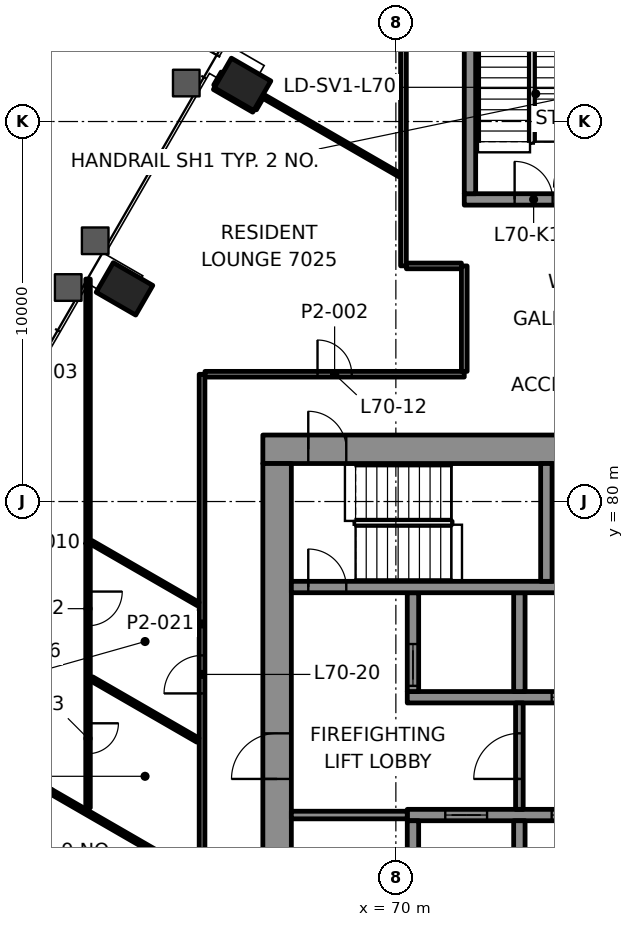
"""IFC4 building model, lengths in metres.
Left out: names, types, materials, properties, quantities, classifications, styles, units other than length and angle.
Written with IfcOpenShell. Run it as: python <this file> out.ifc"""

import sys

from ifc_helpers import new_model, si_unit, direction, frame, frame_2d, origin, origin_2d, place, context, subcontext, project, spatial, rectangle, hollow_rectangle, extrude, element, fill, save


model = new_model("IFC4")
c1 = context("Model", 3, precision=1e-05, world=origin(), true_north=direction((0.0, 1.0)))
c2 = subcontext(c1, "Body", "Model", "MODEL_VIEW")
j1 = project(units=[si_unit("LENGTHUNIT", "METRE"), si_unit("PLANEANGLEUNIT", "RADIAN")], contexts=[c1])
p1 = place(None, origin())
s1 = spatial("IfcSite", under=j1, at=p1, CompositionType="ELEMENT")
p2 = place(p1, origin())
s2 = spatial("IfcBuilding", under=s1, at=p2, CompositionType="ELEMENT")
p3 = place(p2, frame((0.0, 0.0, 291.6)))
s3 = spatial("IfcBuildingStorey", under=s2, at=p3, CompositionType="ELEMENT", Elevation=291.6)
for number, where, z_axis, x_axis in (
    (1, (65.966, 90.978, -0.0), (0.0, 0.0, 1.0), (-0.5, -0.866, 0.0)),
    (2, (62.859, 85.597, -0.0), (0.0, 0.0, 1.0), (-0.5, -0.866, 0.0)),
):
    element("IfcColumn", number, at=place(p3, frame(where, z_axis=z_axis, x_axis=x_axis)), inside=s3, PredefinedType="COLUMN", context=c2, shape_type="SweptSolid", body=[
        extrude(hollow_rectangle(XDim=0.9, YDim=1.2, WallThickness=0.06, at=origin_2d()), origin(), (0.0, 0.0, 1.0), 3.5),
    ])
p4 = place(p3, frame((66.5, 81.375, 0.0), z_axis=(0.0, 0.0, 1.0), x_axis=(1.0, 0.0, 0.0)))
e3 = element("IfcWall", 3, at=p4, inside=s3, PredefinedType="SHEAR", context=c2, shape_type="SweptSolid", body=[
    extrude(rectangle(XDim=17.0, YDim=0.75, at=frame_2d((8.5, 0.0))), origin(), (0.0, 0.0, 1.0), 3.3),
])
p5 = place(p4, frame((1.195, 0.0, 0.0)))
e4 = element("IfcOpeningElement", 4, at=p5, cuts=e3, PredefinedType="OPENING", context=c2, shape_type="SweptSolid", body=[
    extrude(rectangle(XDim=1.0, YDim=2.1, at=frame_2d((0.5, 1.05))), frame((0.0, 0.385, 0.0), z_axis=(0.0, -1.0, 0.0), x_axis=(1.0, 0.0, 0.0)), (0.0, 0.0, 1.0), 0.77),
])
p6 = place(p4, frame((15.005, 0.0, 0.0)))
e5 = element("IfcOpeningElement", 5, at=p6, cuts=e3, PredefinedType="OPENING", context=c2, shape_type="SweptSolid", body=[
    extrude(rectangle(XDim=1.0, YDim=2.1, at=frame_2d((0.5, 1.05))), frame((0.0, 0.385, 0.0), z_axis=(0.0, -1.0, 0.0), x_axis=(1.0, 0.0, 0.0)), (0.0, 0.0, 1.0), 0.77),
])
p7 = place(p4, frame((8.15, 0.0, 0.0)))
e6 = element("IfcOpeningElement", 6, at=p7, cuts=e3, PredefinedType="OPENING", context=c2, shape_type="SweptSolid", body=[
    extrude(rectangle(XDim=0.9, YDim=2.1, at=frame_2d((0.45, 1.05))), frame((0.0, 0.385, 0.0), z_axis=(0.0, -1.0, 0.0), x_axis=(1.0, 0.0, 0.0)), (0.0, 0.0, 1.0), 0.77),
])
p8 = place(p3, frame((66.875, 69.0, 0.0), z_axis=(0.0, 0.0, 1.0), x_axis=(0.0, 1.0, 0.0)))
e7 = element("IfcWall", 7, at=p8, inside=s3, PredefinedType="SHEAR", context=c2, shape_type="SweptSolid", body=[
    extrude(rectangle(XDim=12.0, YDim=0.75, at=frame_2d((6.0, 0.0))), origin(), (0.0, 0.0, 1.0), 3.3),
])
p9 = place(p8, frame((3.7, 0.0, 0.0)))
e8 = element("IfcOpeningElement", 8, at=p9, cuts=e7, PredefinedType="OPENING", context=c2, shape_type="SweptSolid", body=[
    extrude(rectangle(XDim=1.2, YDim=2.1, at=frame_2d((0.6, 1.05))), frame((0.0, 0.385, 0.0), z_axis=(0.0, -1.0, 0.0), x_axis=(1.0, 0.0, 0.0)), (0.0, 0.0, 1.0), 0.77),
])
p10 = place(p3, frame((70.3, 71.75, 0.0), z_axis=(0.0, 0.0, 1.0), x_axis=(1.0, 0.0, 0.0)))
e9 = element("IfcWall", 9, at=p10, inside=s3, PredefinedType="SHEAR", context=c2, shape_type="SweptSolid", body=[
    extrude(rectangle(XDim=11.5, YDim=0.3, at=frame_2d((5.75, 0.0))), origin(), (0.0, 0.0, 1.0), 3.3),
])
p11 = place(p10, frame((1.0, 0.0, 0.0)))
e10 = element("IfcOpeningElement", 10, at=p11, cuts=e9, PredefinedType="OPENING", context=c2, shape_type="SweptSolid", body=[
    extrude(rectangle(XDim=1.1, YDim=2.1, at=frame_2d((0.55, 1.05))), frame((0.0, 0.16, 0.0), z_axis=(0.0, -1.0, 0.0), x_axis=(1.0, 0.0, 0.0)), (0.0, 0.0, 1.0), 0.32),
])
p12 = place(p10, frame((3.8, 0.0, 0.0)))
e11 = element("IfcOpeningElement", 11, at=p12, cuts=e9, PredefinedType="OPENING", context=c2, shape_type="SweptSolid", body=[
    extrude(rectangle(XDim=1.1, YDim=2.1, at=frame_2d((0.55, 1.05))), frame((0.0, 0.16, 0.0), z_axis=(0.0, -1.0, 0.0), x_axis=(1.0, 0.0, 0.0)), (0.0, 0.0, 1.0), 0.32),
])
p13 = place(p10, frame((6.6, 0.0, 0.0)))
e12 = element("IfcOpeningElement", 12, at=p13, cuts=e9, PredefinedType="OPENING", context=c2, shape_type="SweptSolid", body=[
    extrude(rectangle(XDim=1.1, YDim=2.1, at=frame_2d((0.55, 1.05))), frame((0.0, 0.16, 0.0), z_axis=(0.0, -1.0, 0.0), x_axis=(1.0, 0.0, 0.0)), (0.0, 0.0, 1.0), 0.32),
])
p14 = place(p10, frame((9.4, 0.0, 0.0)))
e13 = element("IfcOpeningElement", 13, at=p14, cuts=e9, PredefinedType="OPENING", context=c2, shape_type="SweptSolid", body=[
    extrude(rectangle(XDim=1.1, YDim=2.1, at=frame_2d((0.55, 1.05))), frame((0.0, 0.16, 0.0), z_axis=(0.0, -1.0, 0.0), x_axis=(1.0, 0.0, 0.0)), (0.0, 0.0, 1.0), 0.32),
])
p15 = place(p3, frame((70.3, 74.85, 0.0), z_axis=(0.0, 0.0, 1.0), x_axis=(1.0, 0.0, 0.0)))
e14 = element("IfcWall", 14, at=p15, inside=s3, PredefinedType="SHEAR", context=c2, shape_type="SweptSolid", body=[
    extrude(rectangle(XDim=5.9, YDim=0.3, at=frame_2d((2.95, 0.0))), origin(), (0.0, 0.0, 1.0), 3.3),
])
p16 = place(p15, frame((3.8, 0.0, 0.0)))
e15 = element("IfcOpeningElement", 15, at=p16, cuts=e14, PredefinedType="OPENING", context=c2, shape_type="SweptSolid", body=[
    extrude(rectangle(XDim=1.1, YDim=2.1, at=frame_2d((0.55, 1.05))), frame((0.0, 0.16, 0.0), z_axis=(0.0, -1.0, 0.0), x_axis=(1.0, 0.0, 0.0)), (0.0, 0.0, 1.0), 0.32),
])
p17 = place(p3, frame((70.45, 69.0, 0.0), z_axis=(0.0, 0.0, 1.0), x_axis=(0.0, 1.0, 0.0)))
e16 = element("IfcWall", 16, at=p17, inside=s3, PredefinedType="SHEAR", context=c2, shape_type="SweptSolid", body=[
    extrude(rectangle(XDim=2.6, YDim=0.3, at=frame_2d((1.3, 0.0))), origin(), (0.0, 0.0, 1.0), 3.3),
])
p18 = place(p3, frame((70.45, 75.0, 0.0), z_axis=(0.0, 0.0, 1.0), x_axis=(0.0, 1.0, 0.0)))
e17 = element("IfcWall", 17, at=p18, inside=s3, PredefinedType="SHEAR", context=c2, shape_type="SweptSolid", body=[
    extrude(rectangle(XDim=2.6, YDim=0.3, at=frame_2d((1.3, 0.0))), origin(), (0.0, 0.0, 1.0), 3.3),
])
p19 = place(p18, frame((0.15, 0.0, 0.0)))
e18 = element("IfcOpeningElement", 18, at=p19, cuts=e17, PredefinedType="OPENING", context=c2, shape_type="SweptSolid", body=[
    extrude(rectangle(XDim=1.1, YDim=2.1, at=frame_2d((0.55, 1.05))), frame((0.0, 0.16, 0.0), z_axis=(0.0, -1.0, 0.0), x_axis=(1.0, 0.0, 0.0)), (0.0, 0.0, 1.0), 0.32),
])
for number, where, z_axis, x_axis in (
    (19, (73.25, 69.0, 0.0), (0.0, 0.0, 1.0), (0.0, 1.0, 0.0)),
    (20, (73.25, 75.0, 0.0), (0.0, 0.0, 1.0), (0.0, 1.0, 0.0)),
):
    element("IfcWall", number, at=place(p3, frame(where, z_axis=z_axis, x_axis=x_axis)), inside=s3, PredefinedType="SHEAR", context=c2, shape_type="SweptSolid", body=[
        extrude(rectangle(XDim=2.6, YDim=0.3, at=frame_2d((1.3, 0.0))), origin(), (0.0, 0.0, 1.0), 3.3),
    ])
p20 = place(p3, frame((67.25, 77.75, 0.0), z_axis=(0.0, 0.0, 1.0), x_axis=(1.0, 0.0, 0.0)))
e21 = element("IfcWall", 21, at=p20, inside=s3, PredefinedType="SHEAR", context=c2, shape_type="SweptSolid", body=[
    extrude(rectangle(XDim=15.5, YDim=0.3, at=frame_2d((7.75, 0.0))), origin(), (0.0, 0.0, 1.0), 3.3),
])
p21 = place(p20, frame((0.445, 0.0, 0.0)))
e22 = element("IfcOpeningElement", 22, at=p21, cuts=e21, PredefinedType="OPENING", context=c2, shape_type="SweptSolid", body=[
    extrude(rectangle(XDim=1.0, YDim=2.1, at=frame_2d((0.5, 1.05))), frame((0.0, 0.16, 0.0), z_axis=(0.0, -1.0, 0.0), x_axis=(1.0, 0.0, 0.0)), (0.0, 0.0, 1.0), 0.32),
])
p22 = place(p3, frame((73.96, 77.9, 0.0), z_axis=(0.0, 0.0, 1.0), x_axis=(0.0, 1.0, 0.0)))
e23 = element("IfcWall", 23, at=p22, inside=s3, PredefinedType="SHEAR", context=c2, shape_type="SweptSolid", body=[
    extrude(rectangle(XDim=3.1, YDim=0.3, at=frame_2d((1.55, 0.0))), origin(), (0.0, 0.0, 1.0), 3.3),
])
p23 = place(p3, frame((71.8, 87.95, 0.0), z_axis=(0.0, 0.0, 1.0), x_axis=(1.0, 0.0, 0.0)))
e24 = element("IfcWall", 24, at=p23, inside=s3, PredefinedType="SHEAR", context=c2, shape_type="SweptSolid", body=[
    extrude(rectangle(XDim=6.4, YDim=0.3, at=frame_2d((3.2, 0.0))), origin(), (0.0, 0.0, 1.0), 3.3),
])
p24 = place(p23, frame((1.325, 0.0, 0.0)))
e25 = element("IfcOpeningElement", 25, at=p24, cuts=e24, PredefinedType="OPENING", context=c2, shape_type="SweptSolid", body=[
    extrude(rectangle(XDim=1.0, YDim=2.1, at=frame_2d((0.5, 1.05))), frame((0.0, 0.16, 0.0), z_axis=(0.0, -1.0, 0.0), x_axis=(1.0, 0.0, 0.0)), (0.0, 0.0, 1.0), 0.32),
])
p25 = place(p23, frame((4.125, 0.0, 0.0)))
e26 = element("IfcOpeningElement", 26, at=p25, cuts=e24, PredefinedType="OPENING", context=c2, shape_type="SweptSolid", body=[
    extrude(rectangle(XDim=1.2, YDim=2.1, at=frame_2d((0.6, 1.05))), frame((0.0, 0.16, 0.0), z_axis=(0.0, -1.0, 0.0), x_axis=(1.0, 0.0, 0.0)), (0.0, 0.0, 1.0), 0.32),
])
p26 = place(p3, frame((71.95, 88.1, 0.0), z_axis=(0.0, 0.0, 1.0), x_axis=(0.0, 1.0, 0.0)))
e27 = element("IfcWall", 27, at=p26, inside=s3, PredefinedType="SHEAR", context=c2, shape_type="SweptSolid", body=[
    extrude(rectangle(XDim=6.2, YDim=0.3, at=frame_2d((3.1, 0.0))), origin(), (0.0, 0.0, 1.0), 3.3),
])
p27 = place(p3, frame((64.977, 83.35, 0.0), z_axis=(0.0, 0.0, 1.0), x_axis=(1.0, 0.0, 0.0)))
e28 = element("IfcWall", 28, at=p27, inside=s3, PredefinedType="PARTITIONING", context=c2, shape_type="SweptSolid", body=[
    extrude(rectangle(XDim=6.823, YDim=0.15, at=frame_2d((3.412, 0.0))), origin(), (0.0, 0.0, 1.0), 2.7),
])
p28 = place(p27, frame((2.961, 0.0, 0.0)))
e29 = element("IfcOpeningElement", 29, at=p28, cuts=e28, PredefinedType="OPENING", context=c2, shape_type="SweptSolid", body=[
    extrude(rectangle(XDim=0.9, YDim=2.1, at=frame_2d((0.45, 1.05))), frame((0.0, 0.085, 0.0), z_axis=(0.0, -1.0, 0.0), x_axis=(1.0, 0.0, 0.0)), (0.0, 0.0, 1.0), 0.17),
])
p29 = place(p3, frame((70.277, 86.2, 0.0), z_axis=(0.0, 0.0, 1.0), x_axis=(1.0, 0.0, 0.0)))
e30 = element("IfcWall", 30, at=p29, inside=s3, PredefinedType="PARTITIONING", context=c2, shape_type="SweptSolid", body=[
    extrude(rectangle(XDim=1.448, YDim=0.15, at=frame_2d((0.724, 0.0))), origin(), (0.0, 0.0, 1.0), 2.7),
])
p30 = place(p3, frame((66.288, 90.333, 0.0), z_axis=(0.0, 0.0, 1.0), x_axis=(0.499620918551, 0.866244155967, 0.0)))
e31 = element("IfcWall", 31, at=p30, inside=s3, PredefinedType="PARTITIONING", context=c2, shape_type="SweptSolid", body=[
    extrude(rectangle(XDim=0.347, YDim=0.1, at=frame_2d((0.173, 0.0))), origin(), (0.0, 0.0, 1.0), 2.7),
])
p31 = place(p3, frame((65.251, 90.938, 0.0), z_axis=(0.0, 0.0, 1.0), x_axis=(0.500225704022, 0.865895054285, 0.0)))
e32 = element("IfcWall", 32, at=p31, inside=s3, PredefinedType="PARTITIONING", context=c2, shape_type="SweptSolid", body=[
    extrude(rectangle(XDim=0.392, YDim=0.1, at=frame_2d((0.196, 0.0))), origin(), (0.0, 0.0, 1.0), 2.7),
])
p32 = place(p3, frame((71.8, 83.425, 0.0), z_axis=(0.0, 0.0, 1.0), x_axis=(0.0, 1.0, 0.0)))
e33 = element("IfcWall", 33, at=p32, inside=s3, PredefinedType="PARTITIONING", context=c2, shape_type="SweptSolid", body=[
    extrude(rectangle(XDim=2.775, YDim=0.15, at=frame_2d((1.387, 0.0))), origin(), (0.0, 0.0, 1.0), 2.697),
])
p33 = place(p3, frame((70.2, 86.202, 0.0), z_axis=(0.0, 0.0, 1.0), x_axis=(0.0, 1.0, 0.0)))
e34 = element("IfcWall", 34, at=p33, inside=s3, PredefinedType="PARTITIONING", context=c2, shape_type="SweptSolid", body=[
    extrude(rectangle(XDim=9.998, YDim=0.15, at=frame_2d((4.999, 0.0))), origin(), (0.0, 0.0, 1.0), 2.7),
])
p34 = place(p3, frame((64.9, 70.208, 0.0), z_axis=(0.0, 0.0, 1.0), x_axis=(0.0, 1.0, 0.0)))
e35 = element("IfcWall", 35, at=p34, inside=s3, PredefinedType="PARTITIONING", context=c2, shape_type="SweptSolid", body=[
    extrude(rectangle(XDim=13.14, YDim=0.15, at=frame_2d((6.57, 0.0))), origin(), (0.0, 0.0, 1.0), 2.7),
])
p35 = place(p34, frame((4.743, 0.0, 0.0)))
e36 = element("IfcOpeningElement", 36, at=p35, cuts=e35, PredefinedType="OPENING", context=c2, shape_type="SweptSolid", body=[
    extrude(rectangle(XDim=1.0, YDim=2.1, at=frame_2d((0.5, 1.05))), frame((0.0, 0.085, 0.0), z_axis=(0.0, -1.0, 0.0), x_axis=(1.0, 0.0, 0.0)), (0.0, 0.0, 1.0), 0.17),
])
p36 = place(p3, frame((61.9, 85.855, 0.0), z_axis=(0.0, 0.0, 1.0), x_axis=(0.0, -1.0, 0.0)))
e37 = element("IfcWall", 37, at=p36, inside=s3, PredefinedType="PARTITIONING", context=c2, shape_type="SweptSolid", body=[
    extrude(rectangle(XDim=13.915, YDim=0.12, at=frame_2d((6.958, 0.0))), origin(), (0.0, 0.0, 1.0), 2.688),
])
p37 = place(p36, frame((8.224, 0.0, 0.0)))
e38 = element("IfcOpeningElement", 38, at=p37, cuts=e37, PredefinedType="OPENING", context=c2, shape_type="SweptSolid", body=[
    extrude(rectangle(XDim=0.9, YDim=2.1, at=frame_2d((0.45, 1.05))), frame((0.0, 0.07, 0.0), z_axis=(0.0, -1.0, 0.0), x_axis=(1.0, 0.0, 0.0)), (0.0, 0.0, 1.0), 0.14),
])
p38 = place(p36, frame((11.69, 0.0, 0.0)))
e39 = element("IfcOpeningElement", 39, at=p38, cuts=e37, PredefinedType="OPENING", context=c2, shape_type="SweptSolid", body=[
    extrude(rectangle(XDim=0.8, YDim=2.1, at=frame_2d((0.4, 1.05))), frame((0.0, 0.07, 0.0), z_axis=(0.0, -1.0, 0.0), x_axis=(1.0, 0.0, 0.0)), (0.0, 0.0, 1.0), 0.14),
])
p39 = place(p3, frame((70.099, 88.592, 0.0), z_axis=(0.0, 0.0, 1.0), x_axis=(-0.866045268016, 0.499965592563, 0.0)))
e40 = element("IfcWall", 40, at=p39, inside=s3, PredefinedType="PARTITIONING", context=c2, shape_type="SweptSolid", body=[
    extrude(rectangle(XDim=4.172, YDim=0.1, at=frame_2d((2.086, 0.0))), origin(), (0.0, 0.0, 1.0), 2.7),
])
p40 = place(p3, frame((66.258, 90.29, 0.0), z_axis=(0.0, 0.0, 1.0), x_axis=(-0.866032345022, 0.499987977232, 0.0)))
e41 = element("IfcWall", 41, at=p40, inside=s3, PredefinedType="PARTITIONING", context=c2, shape_type="SweptSolid", body=[
    extrude(rectangle(XDim=1.194, YDim=0.1, at=frame_2d((0.597, 0.0))), origin(), (0.0, 0.0, 1.0), 2.688),
])
p41 = place(p3, frame((64.799, 77.302, 0.0), z_axis=(0.0, 0.0, 1.0), x_axis=(-0.866000336211, 0.500043415797, 0.0)))
e42 = element("IfcWall", 42, at=p41, inside=s3, PredefinedType="PARTITIONING", context=c2, shape_type="SweptSolid", body=[
    extrude(rectangle(XDim=3.248, YDim=0.1, at=frame_2d((1.624, 0.0))), origin(), (0.0, 0.0, 1.0), 2.7),
])
p42 = place(p3, frame((64.791, 73.72, 0.0), z_axis=(0.0, 0.0, 1.0), x_axis=(-0.866033195618, 0.499986503906, 0.0)))
e43 = element("IfcWall", 43, at=p42, inside=s3, PredefinedType="PARTITIONING", context=c2, shape_type="SweptSolid", body=[
    extrude(rectangle(XDim=3.228, YDim=0.12, at=frame_2d((1.614, 0.0))), origin(), (0.0, 0.0, 1.0), 2.7),
])
p43 = place(p3, frame((64.67, 70.202, 0.0), z_axis=(0.0, 0.0, 1.0), x_axis=(-0.866027476775, 0.499996409458, 0.0)))
e44 = element("IfcWall", 44, at=p43, inside=s3, PredefinedType="PARTITIONING", context=c2, shape_type="SweptSolid", body=[
    extrude(rectangle(XDim=8.666, YDim=0.12, at=frame_2d((4.333, 0.0))), origin(), (0.0, 0.0, 1.0), 2.7),
])
p44 = place(p3, frame((67.25, 71.75, 0.0), z_axis=(0.0, 0.0, 1.0), x_axis=(1.0, 0.0, 0.0)))
e45 = element("IfcWall", 45, at=p44, inside=s3, PredefinedType="PARTITIONING", context=c2, shape_type="SweptSolid", body=[
    extrude(rectangle(XDim=3.05, YDim=0.2, at=frame_2d((1.525, 0.0))), origin(), (0.0, 0.0, 1.0), 3.3),
])
p45 = place(p3, frame((73.25, 71.9, 0.0), z_axis=(0.0, 0.0, 1.0), x_axis=(0.0, 1.0, 0.0)))
e46 = element("IfcWall", 46, at=p45, inside=s3, PredefinedType="PARTITIONING", context=c2, shape_type="SweptSolid", body=[
    extrude(rectangle(XDim=2.8, YDim=0.2, at=frame_2d((1.4, 0.0))), origin(), (0.0, 0.0, 1.0), 3.3),
])
p46 = place(p45, frame((0.8, 0.0, 0.0)))
e47 = element("IfcOpeningElement", 47, at=p46, cuts=e46, PredefinedType="OPENING", context=c2, shape_type="SweptSolid", body=[
    extrude(rectangle(XDim=1.2, YDim=2.1, at=frame_2d((0.6, 1.05))), frame((0.0, 0.11, 0.0), z_axis=(0.0, -1.0, 0.0), x_axis=(1.0, 0.0, 0.0)), (0.0, 0.0, 1.0), 0.22),
])
p47 = place(p28, origin())
e48 = element("IfcDoor", 48, at=p47, inside=s3, OperationType="SINGLE_SWING_RIGHT", PredefinedType="DOOR", context=c2, shape_type="SweptSolid", body=[
    extrude(rectangle(XDim=0.9, YDim=2.1, at=frame_2d((0.45, 1.05))), frame((0.0, 0.025, 0.0), z_axis=(0.0, -1.0, 0.0), x_axis=(1.0, 0.0, 0.0)), (0.0, 0.0, 1.0), 0.05),
])
fill(e29, e48)
p48 = place(p35, origin())
e49 = element("IfcDoor", 49, at=p48, inside=s3, OperationType="SINGLE_SWING_RIGHT", PredefinedType="DOOR", context=c2, shape_type="SweptSolid", body=[
    extrude(rectangle(XDim=1.0, YDim=2.1, at=frame_2d((0.5, 1.05))), frame((0.0, 0.025, 0.0), z_axis=(0.0, -1.0, 0.0), x_axis=(1.0, 0.0, 0.0)), (0.0, 0.0, 1.0), 0.05),
])
fill(e36, e49)
p49 = place(p37, origin())
e50 = element("IfcDoor", 50, at=p49, inside=s3, OperationType="SINGLE_SWING_RIGHT", PredefinedType="DOOR", context=c2, shape_type="SweptSolid", body=[
    extrude(rectangle(XDim=0.9, YDim=2.1, at=frame_2d((0.45, 1.05))), frame((0.0, 0.025, 0.0), z_axis=(0.0, -1.0, 0.0), x_axis=(1.0, 0.0, 0.0)), (0.0, 0.0, 1.0), 0.05),
])
fill(e38, e50)
p50 = place(p38, origin())
e51 = element("IfcDoor", 51, at=p50, inside=s3, OperationType="SINGLE_SWING_RIGHT", PredefinedType="DOOR", context=c2, shape_type="SweptSolid", body=[
    extrude(rectangle(XDim=0.8, YDim=2.1, at=frame_2d((0.4, 1.05))), frame((0.0, 0.025, 0.0), z_axis=(0.0, -1.0, 0.0), x_axis=(1.0, 0.0, 0.0)), (0.0, 0.0, 1.0), 0.05),
])
fill(e39, e51)
p51 = place(p11, origin())
e52 = element("IfcDoor", 52, at=p51, inside=s3, OperationType="DOUBLE_DOOR_SLIDING", PredefinedType="DOOR", context=c2, shape_type="SweptSolid", body=[
    extrude(rectangle(XDim=1.1, YDim=2.1, at=frame_2d((0.55, 1.05))), frame((0.0, 0.025, 0.0), z_axis=(0.0, -1.0, 0.0), x_axis=(1.0, 0.0, 0.0)), (0.0, 0.0, 1.0), 0.05),
])
fill(e10, e52)
p52 = place(p12, origin())
e53 = element("IfcDoor", 53, at=p52, inside=s3, OperationType="DOUBLE_DOOR_SLIDING", PredefinedType="DOOR", context=c2, shape_type="SweptSolid", body=[
    extrude(rectangle(XDim=1.1, YDim=2.1, at=frame_2d((0.55, 1.05))), frame((0.0, 0.025, 0.0), z_axis=(0.0, -1.0, 0.0), x_axis=(1.0, 0.0, 0.0)), (0.0, 0.0, 1.0), 0.05),
])
fill(e11, e53)
p53 = place(p19, origin())
e54 = element("IfcDoor", 54, at=p53, inside=s3, OperationType="DOUBLE_DOOR_SLIDING", PredefinedType="DOOR", context=c2, shape_type="SweptSolid", body=[
    extrude(rectangle(XDim=1.1, YDim=2.1, at=frame_2d((0.55, 1.05))), frame((0.0, 0.025, 0.0), z_axis=(0.0, -1.0, 0.0), x_axis=(1.0, 0.0, 0.0)), (0.0, 0.0, 1.0), 0.05),
])
fill(e18, e54)
p54 = place(p16, origin())
e55 = element("IfcDoor", 55, at=p54, inside=s3, OperationType="DOUBLE_DOOR_SLIDING", PredefinedType="DOOR", context=c2, shape_type="SweptSolid", body=[
    extrude(rectangle(XDim=1.1, YDim=2.1, at=frame_2d((0.55, 1.05))), frame((0.0, 0.025, 0.0), z_axis=(0.0, -1.0, 0.0), x_axis=(1.0, 0.0, 0.0)), (0.0, 0.0, 1.0), 0.05),
])
fill(e15, e55)
p55 = place(p21, origin())
e56 = element("IfcDoor", 56, at=p55, inside=s3, OperationType="SINGLE_SWING_LEFT", PredefinedType="DOOR", context=c2, shape_type="SweptSolid", body=[
    extrude(rectangle(XDim=1.0, YDim=2.1, at=frame_2d((0.5, 1.05))), frame((0.0, 0.025, 0.0), z_axis=(0.0, -1.0, 0.0), x_axis=(1.0, 0.0, 0.0)), (0.0, 0.0, 1.0), 0.05),
])
fill(e22, e56)
p56 = place(p5, origin())
e57 = element("IfcDoor", 57, at=p56, inside=s3, OperationType="SINGLE_SWING_RIGHT", PredefinedType="DOOR", context=c2, shape_type="SweptSolid", body=[
    extrude(rectangle(XDim=1.0, YDim=2.1, at=frame_2d((0.5, 1.05))), frame((0.0, 0.095, 0.0), z_axis=(0.0, -1.0, 0.0), x_axis=(1.0, 0.0, 0.0)), (0.0, 0.0, 1.0), 0.19),
])
fill(e4, e57)
p57 = place(p24, origin())
e58 = element("IfcDoor", 58, at=p57, inside=s3, OperationType="SINGLE_SWING_RIGHT", PredefinedType="DOOR", context=c2, shape_type="SweptSolid", body=[
    extrude(rectangle(XDim=1.0, YDim=2.1, at=frame_2d((0.5, 1.05))), frame((0.0, 0.025, 0.0), z_axis=(0.0, -1.0, 0.0), x_axis=(1.0, 0.0, 0.0)), (0.0, 0.0, 1.0), 0.05),
])
fill(e25, e58)
p58 = place(p46, origin())
e59 = element("IfcDoor", 59, at=p58, inside=s3, OperationType="SINGLE_SWING_LEFT", PredefinedType="DOOR", context=c2, shape_type="SweptSolid", body=[
    extrude(rectangle(XDim=1.2, YDim=2.1, at=frame_2d((0.6, 1.05))), frame((0.0, 0.025, 0.0), z_axis=(0.0, -1.0, 0.0), x_axis=(1.0, 0.0, 0.0)), (0.0, 0.0, 1.0), 0.05),
])
fill(e47, e59)
p59 = place(p9, origin())
e60 = element("IfcDoor", 60, at=p59, inside=s3, OperationType="SINGLE_SWING_RIGHT", PredefinedType="DOOR", context=c2, shape_type="SweptSolid", body=[
    extrude(rectangle(XDim=1.2, YDim=2.1, at=frame_2d((0.6, 1.05))), frame((0.0, 0.095, 0.0), z_axis=(0.0, -1.0, 0.0), x_axis=(1.0, 0.0, 0.0)), (0.0, 0.0, 1.0), 0.19),
])
fill(e8, e60)
save(model, sys.argv[1])
